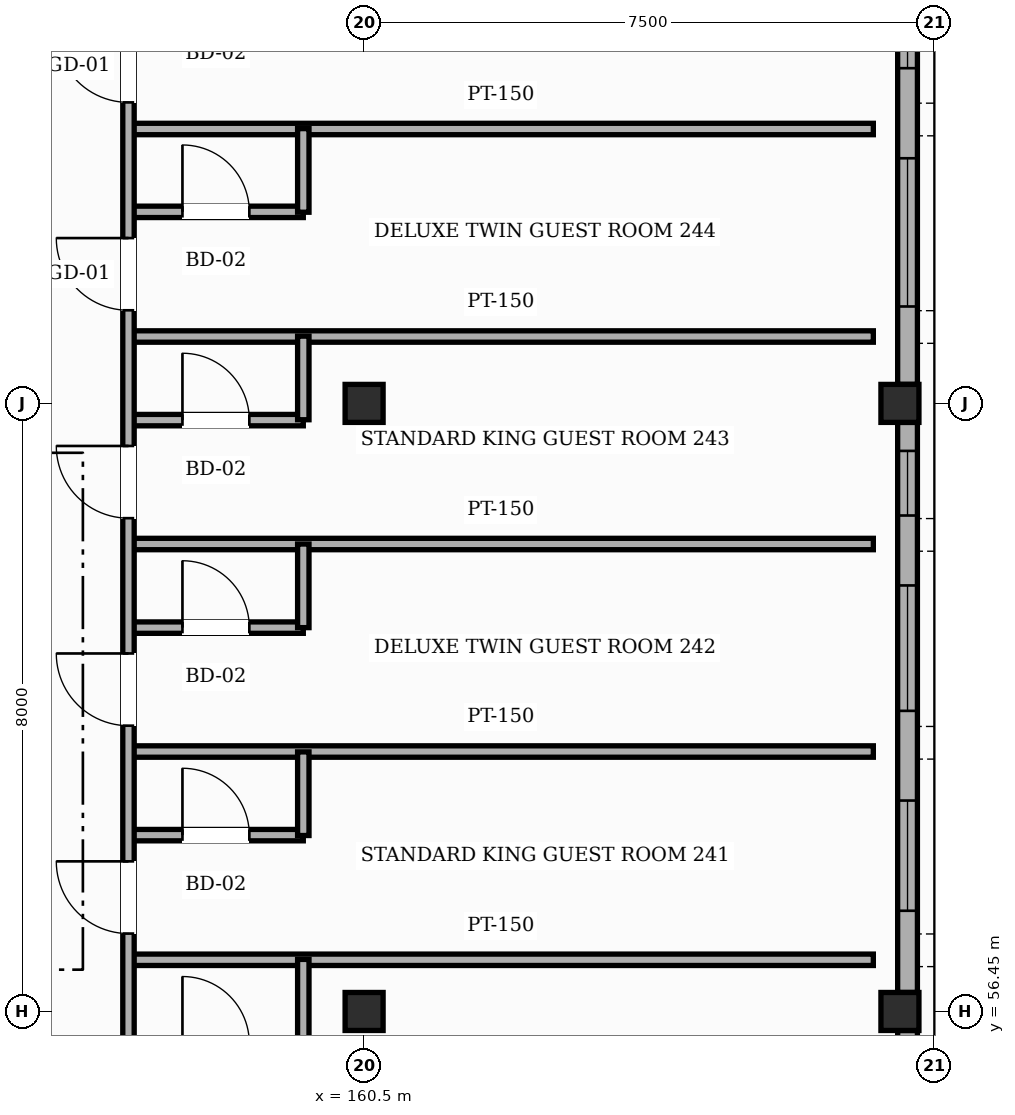
"""IFC4 building model, lengths in metres.
Left out: names, types, materials, properties, quantities, classifications, styles, units other than length and angle.
Written with IfcOpenShell. Run it as: python <this file> out.ifc"""

import sys

from ifc_helpers import new_model, si_unit, direction, frame, frame_2d, origin, origin_2d, place, context, subcontext, project, spatial, rectangle, hollow_rectangle, extrude, element, fill, save


model = new_model("IFC4")
c1 = context("Model", 3, precision=1e-05, world=origin(), true_north=direction((0.0, 1.0)))
c2 = subcontext(c1, "Body", "Model", "MODEL_VIEW")
j1 = project(units=[si_unit("LENGTHUNIT", "METRE"), si_unit("PLANEANGLEUNIT", "RADIAN")], contexts=[c1])
p1 = place(None, origin())
s1 = spatial("IfcSite", under=j1, at=p1, CompositionType="ELEMENT")
p2 = place(p1, origin())
s2 = spatial("IfcBuilding", under=s1, at=p2, CompositionType="ELEMENT")
p3 = place(p2, frame((0.0, 0.0, 35.4)))
s3 = spatial("IfcBuildingStorey", under=s2, at=p3, CompositionType="ELEMENT", Elevation=35.4)
for number, where, z_axis, x_axis in (
    (1, (160.5, 56.45, 0.0), (0.0, 0.0, 1.0), (1.0, 0.0, 0.0)),
    (2, (160.5, 64.45, 0.0), (0.0, 0.0, 1.0), (1.0, 0.0, 0.0)),
    (3, (167.55, 56.45, 0.0), (0.0, 0.0, 1.0), (1.0, 0.0, 0.0)),
    (4, (167.55, 64.45, 0.0), (0.0, 0.0, 1.0), (1.0, 0.0, 0.0)),
):
    element("IfcColumn", number, at=place(p3, frame(where, z_axis=z_axis, x_axis=x_axis)), inside=s3, PredefinedType="COLUMN", context=c2, shape_type="SweptSolid", body=[
        extrude(hollow_rectangle(XDim=0.5, YDim=0.5, WallThickness=0.022, InnerFilletRadius=0.022, OuterFilletRadius=0.044, at=origin_2d()), origin(), (0.0, 0.0, 1.0), 3.6),
    ])
p4 = place(p3, frame((167.65, 56.2, 0.0), z_axis=(0.0, 0.0, 1.0), x_axis=(0.0, -1.0, 0.0)))
e5 = element("IfcWall", 5, at=p4, inside=s3, PredefinedType="SOLIDWALL", context=c2, shape_type="SweptSolid", body=[
    extrude(rectangle(XDim=1.8, YDim=0.26, at=frame_2d((0.9, 0.0))), origin(), (0.0, 0.0, 1.0), 2.755),
])
p5 = place(p4, frame((0.275, 0.0, 0.85)))
e6 = element("IfcOpeningElement", 6, at=p5, cuts=e5, PredefinedType="OPENING", context=c2, shape_type="SweptSolid", body=[
    extrude(rectangle(XDim=1.25, YDim=1.35, at=frame_2d((0.625, 0.675))), frame((0.0, 0.14, 0.0), z_axis=(0.0, -1.0, 0.0), x_axis=(1.0, 0.0, 0.0)), (0.0, 0.0, 1.0), 0.28),
])
p6 = place(p3, frame((167.65, 64.2, 0.0), z_axis=(0.0, 0.0, 1.0), x_axis=(0.0, -1.0, 0.0)))
e7 = element("IfcWall", 7, at=p6, inside=s3, PredefinedType="SOLIDWALL", context=c2, shape_type="SweptSolid", body=[
    extrude(rectangle(XDim=7.5, YDim=0.26, at=frame_2d((3.75, 0.0))), origin(), (0.0, 0.0, 1.0), 2.755),
])
p7 = place(p6, frame((4.975, 0.0, 0.85)))
e8 = element("IfcOpeningElement", 8, at=p7, cuts=e7, PredefinedType="OPENING", context=c2, shape_type="SweptSolid", body=[
    extrude(rectangle(XDim=1.45, YDim=1.35, at=frame_2d((0.725, 0.675))), frame((0.0, 0.14, 0.0), z_axis=(0.0, -1.0, 0.0), x_axis=(1.0, 0.0, 0.0)), (0.0, 0.0, 1.0), 0.28),
])
p8 = place(p6, frame((2.145, 0.0, 0.85)))
e9 = element("IfcOpeningElement", 9, at=p8, cuts=e7, PredefinedType="OPENING", context=c2, shape_type="SweptSolid", body=[
    extrude(rectangle(XDim=1.65, YDim=1.35, at=frame_2d((0.825, 0.675))), frame((0.0, 0.14, 0.0), z_axis=(0.0, -1.0, 0.0), x_axis=(1.0, 0.0, 0.0)), (0.0, 0.0, 1.0), 0.28),
])
p9 = place(p6, frame((0.375, 0.0, 0.85)))
e10 = element("IfcOpeningElement", 10, at=p9, cuts=e7, PredefinedType="OPENING", context=c2, shape_type="SweptSolid", body=[
    extrude(rectangle(XDim=0.85, YDim=1.35, at=frame_2d((0.425, 0.675))), frame((0.0, 0.14, 0.0), z_axis=(0.0, -1.0, 0.0), x_axis=(1.0, 0.0, 0.0)), (0.0, 0.0, 1.0), 0.28),
])
p10 = place(p3, frame((167.65, 70.8, 0.0), z_axis=(0.0, 0.0, 1.0), x_axis=(0.0, -1.0, 0.0)))
e11 = element("IfcWall", 11, at=p10, inside=s3, PredefinedType="SOLIDWALL", context=c2, shape_type="SweptSolid", body=[
    extrude(rectangle(XDim=6.1, YDim=0.26, at=frame_2d((3.05, 0.0))), origin(), (0.0, 0.0, 1.0), 3.365),
])
p11 = place(p10, frame((3.125, 0.0, 0.85)))
e12 = element("IfcOpeningElement", 12, at=p11, cuts=e11, PredefinedType="OPENING", context=c2, shape_type="SweptSolid", body=[
    extrude(rectangle(XDim=1.95, YDim=1.95, at=frame_2d((0.975, 0.975))), frame((0.0, 0.14, 0.0), z_axis=(0.0, -1.0, 0.0), x_axis=(1.0, 0.0, 0.0)), (0.0, 0.0, 1.0), 0.28),
])
p12 = place(p10, frame((0.79, 0.0, 0.85)))
e13 = element("IfcOpeningElement", 13, at=p12, cuts=e11, PredefinedType="OPENING", context=c2, shape_type="SweptSolid", body=[
    extrude(rectangle(XDim=1.15, YDim=1.35, at=frame_2d((0.575, 0.675))), frame((0.0, 0.14, 0.0), z_axis=(0.0, -1.0, 0.0), x_axis=(1.0, 0.0, 0.0)), (0.0, 0.0, 1.0), 0.28),
])
p13 = place(p3, frame((157.4, 57.13, 0.0), z_axis=(0.0, 0.0, 1.0), x_axis=(1.0, 0.0, 0.0)))
e14 = element("IfcWall", 14, at=p13, inside=s3, PredefinedType="PARTITIONING", context=c2, shape_type="SweptSolid", body=[
    extrude(rectangle(XDim=9.8, YDim=0.15, at=frame_2d((4.9, 0.0))), origin(), (0.0, 0.0, 1.0), 3.365),
])
p14 = place(p3, frame((157.4, 58.77, 0.0), z_axis=(0.0, 0.0, 1.0), x_axis=(1.0, 0.0, 0.0)))
e15 = element("IfcWall", 15, at=p14, inside=s3, PredefinedType="PARTITIONING", context=c2, shape_type="SweptSolid", body=[
    extrude(rectangle(XDim=2.3, YDim=0.15, at=frame_2d((1.15, 0.0))), origin(), (0.0, 0.0, 1.0), 3.365),
])
p15 = place(p14, frame((0.71, 0.0, 0.0)))
e16 = element("IfcOpeningElement", 16, at=p15, cuts=e15, PredefinedType="OPENING", context=c2, shape_type="SweptSolid", body=[
    extrude(rectangle(XDim=0.88, YDim=2.12, at=frame_2d((0.44, 1.06))), frame((0.0, 0.085, 0.0), z_axis=(0.0, -1.0, 0.0), x_axis=(1.0, 0.0, 0.0)), (0.0, 0.0, 1.0), 0.17),
])
p16 = place(p3, frame((157.4, 59.87, 0.0), z_axis=(0.0, 0.0, 1.0), x_axis=(1.0, 0.0, 0.0)))
e17 = element("IfcWall", 17, at=p16, inside=s3, PredefinedType="PARTITIONING", context=c2, shape_type="SweptSolid", body=[
    extrude(rectangle(XDim=9.8, YDim=0.15, at=frame_2d((4.9, 0.0))), origin(), (0.0, 0.0, 1.0), 3.365),
])
p17 = place(p3, frame((157.4, 61.5, 0.0), z_axis=(0.0, 0.0, 1.0), x_axis=(1.0, 0.0, 0.0)))
e18 = element("IfcWall", 18, at=p17, inside=s3, PredefinedType="PARTITIONING", context=c2, shape_type="SweptSolid", body=[
    extrude(rectangle(XDim=2.3, YDim=0.15, at=frame_2d((1.15, 0.0))), origin(), (0.0, 0.0, 1.0), 3.365),
])
p18 = place(p17, frame((0.71, 0.0, 0.0)))
e19 = element("IfcOpeningElement", 19, at=p18, cuts=e18, PredefinedType="OPENING", context=c2, shape_type="SweptSolid", body=[
    extrude(rectangle(XDim=0.88, YDim=2.12, at=frame_2d((0.44, 1.06))), frame((0.0, 0.085, 0.0), z_axis=(0.0, -1.0, 0.0), x_axis=(1.0, 0.0, 0.0)), (0.0, 0.0, 1.0), 0.17),
])
p19 = place(p3, frame((157.4, 62.6, 0.0), z_axis=(0.0, 0.0, 1.0), x_axis=(1.0, 0.0, 0.0)))
e20 = element("IfcWall", 20, at=p19, inside=s3, PredefinedType="PARTITIONING", context=c2, shape_type="SweptSolid", body=[
    extrude(rectangle(XDim=9.8, YDim=0.15, at=frame_2d((4.9, 0.0))), origin(), (0.0, 0.0, 1.0), 3.365),
])
p20 = place(p3, frame((157.4, 64.23, 0.0), z_axis=(0.0, 0.0, 1.0), x_axis=(1.0, 0.0, 0.0)))
e21 = element("IfcWall", 21, at=p20, inside=s3, PredefinedType="PARTITIONING", context=c2, shape_type="SweptSolid", body=[
    extrude(rectangle(XDim=2.3, YDim=0.15, at=frame_2d((1.15, 0.0))), origin(), (0.0, 0.0, 1.0), 2.755),
])
p21 = place(p20, frame((0.71, 0.0, 0.0)))
e22 = element("IfcOpeningElement", 22, at=p21, cuts=e21, PredefinedType="OPENING", context=c2, shape_type="SweptSolid", body=[
    extrude(rectangle(XDim=0.88, YDim=2.12, at=frame_2d((0.44, 1.06))), frame((0.0, 0.085, 0.0), z_axis=(0.0, -1.0, 0.0), x_axis=(1.0, 0.0, 0.0)), (0.0, 0.0, 1.0), 0.17),
])
p22 = place(p3, frame((157.4, 65.33, 0.0), z_axis=(0.0, 0.0, 1.0), x_axis=(1.0, 0.0, 0.0)))
e23 = element("IfcWall", 23, at=p22, inside=s3, PredefinedType="PARTITIONING", context=c2, shape_type="SweptSolid", body=[
    extrude(rectangle(XDim=9.8, YDim=0.15, at=frame_2d((4.9, 0.0))), origin(), (0.0, 0.0, 1.0), 3.365),
])
p23 = place(p3, frame((157.4, 66.97, 0.0), z_axis=(0.0, 0.0, 1.0), x_axis=(1.0, 0.0, 0.0)))
e24 = element("IfcWall", 24, at=p23, inside=s3, PredefinedType="PARTITIONING", context=c2, shape_type="SweptSolid", body=[
    extrude(rectangle(XDim=2.3, YDim=0.15, at=frame_2d((1.15, 0.0))), origin(), (0.0, 0.0, 1.0), 3.365),
])
p24 = place(p23, frame((0.71, 0.0, 0.0)))
e25 = element("IfcOpeningElement", 25, at=p24, cuts=e24, PredefinedType="OPENING", context=c2, shape_type="SweptSolid", body=[
    extrude(rectangle(XDim=0.88, YDim=2.12, at=frame_2d((0.44, 1.06))), frame((0.0, 0.085, 0.0), z_axis=(0.0, -1.0, 0.0), x_axis=(1.0, 0.0, 0.0)), (0.0, 0.0, 1.0), 0.17),
])
p25 = place(p3, frame((157.4, 68.06, 0.0), z_axis=(0.0, 0.0, 1.0), x_axis=(1.0, 0.0, 0.0)))
e26 = element("IfcWall", 26, at=p25, inside=s3, PredefinedType="PARTITIONING", context=c2, shape_type="SweptSolid", body=[
    extrude(rectangle(XDim=9.8, YDim=0.15, at=frame_2d((4.9, 0.0))), origin(), (0.0, 0.0, 1.0), 3.365),
])
p26 = place(p3, frame((157.4, 22.3, 0.0), z_axis=(0.0, 0.0, 1.0), x_axis=(0.0, 1.0, 0.0)))
e27 = element("IfcWall", 27, at=p26, inside=s3, PredefinedType="PARTITIONING", context=c2, shape_type="SweptSolid", body=[
    extrude(rectangle(XDim=48.5, YDim=0.15, at=frame_2d((24.25, 0.0))), origin(), (0.0, 0.0, 1.0), 3.365),
])
p27 = place(p26, frame((24.875, 0.0, 0.0)))
e28 = element("IfcOpeningElement", 28, at=p27, cuts=e27, PredefinedType="OPENING", context=c2, shape_type="SweptSolid", body=[
    extrude(rectangle(XDim=1.65, YDim=2.35, at=frame_2d((0.825, 1.175))), frame((0.0, 0.085, 0.0), z_axis=(0.0, -1.0, 0.0), x_axis=(1.0, 0.0, 0.0)), (0.0, 0.0, 1.0), 0.17),
])
p28 = place(p26, frame((0.275, 0.0, 0.0)))
e29 = element("IfcOpeningElement", 29, at=p28, cuts=e27, PredefinedType="OPENING", context=c2, shape_type="SweptSolid", body=[
    extrude(rectangle(XDim=1.1, YDim=2.2, at=frame_2d((0.55, 1.1))), frame((0.0, 0.085, 0.0), z_axis=(0.0, -1.0, 0.0), x_axis=(1.0, 0.0, 0.0)), (0.0, 0.0, 1.0), 0.17),
])
p29 = place(p26, frame((3.11, 0.0, 0.0)))
e30 = element("IfcOpeningElement", 30, at=p29, cuts=e27, PredefinedType="OPENING", context=c2, shape_type="SweptSolid", body=[
    extrude(rectangle(XDim=0.95, YDim=2.15, at=frame_2d((0.475, 1.075))), frame((0.0, 0.085, 0.0), z_axis=(0.0, -1.0, 0.0), x_axis=(1.0, 0.0, 0.0)), (0.0, 0.0, 1.0), 0.17),
])
p30 = place(p26, frame((5.865, 0.0, 0.0)))
e31 = element("IfcOpeningElement", 31, at=p30, cuts=e27, PredefinedType="OPENING", context=c2, shape_type="SweptSolid", body=[
    extrude(rectangle(XDim=0.95, YDim=2.15, at=frame_2d((0.475, 1.075))), frame((0.0, 0.085, 0.0), z_axis=(0.0, -1.0, 0.0), x_axis=(1.0, 0.0, 0.0)), (0.0, 0.0, 1.0), 0.17),
])
p31 = place(p26, frame((8.625, 0.0, 0.0)))
e32 = element("IfcOpeningElement", 32, at=p31, cuts=e27, PredefinedType="OPENING", context=c2, shape_type="SweptSolid", body=[
    extrude(rectangle(XDim=0.95, YDim=2.15, at=frame_2d((0.475, 1.075))), frame((0.0, 0.085, 0.0), z_axis=(0.0, -1.0, 0.0), x_axis=(1.0, 0.0, 0.0)), (0.0, 0.0, 1.0), 0.17),
])
p32 = place(p26, frame((11.38, 0.0, 0.0)))
e33 = element("IfcOpeningElement", 33, at=p32, cuts=e27, PredefinedType="OPENING", context=c2, shape_type="SweptSolid", body=[
    extrude(rectangle(XDim=0.95, YDim=2.15, at=frame_2d((0.475, 1.075))), frame((0.0, 0.085, 0.0), z_axis=(0.0, -1.0, 0.0), x_axis=(1.0, 0.0, 0.0)), (0.0, 0.0, 1.0), 0.17),
])
p33 = place(p26, frame((14.14, 0.0, 0.0)))
e34 = element("IfcOpeningElement", 34, at=p33, cuts=e27, PredefinedType="OPENING", context=c2, shape_type="SweptSolid", body=[
    extrude(rectangle(XDim=0.95, YDim=2.15, at=frame_2d((0.475, 1.075))), frame((0.0, 0.085, 0.0), z_axis=(0.0, -1.0, 0.0), x_axis=(1.0, 0.0, 0.0)), (0.0, 0.0, 1.0), 0.17),
])
p34 = place(p26, frame((16.895, 0.0, 0.0)))
e35 = element("IfcOpeningElement", 35, at=p34, cuts=e27, PredefinedType="OPENING", context=c2, shape_type="SweptSolid", body=[
    extrude(rectangle(XDim=0.95, YDim=2.15, at=frame_2d((0.475, 1.075))), frame((0.0, 0.085, 0.0), z_axis=(0.0, -1.0, 0.0), x_axis=(1.0, 0.0, 0.0)), (0.0, 0.0, 1.0), 0.17),
])
p35 = place(p26, frame((32.37, 0.0, 0.0)))
e36 = element("IfcOpeningElement", 36, at=p35, cuts=e27, PredefinedType="OPENING", context=c2, shape_type="SweptSolid", body=[
    extrude(rectangle(XDim=1.1, YDim=2.2, at=frame_2d((0.55, 1.1))), frame((0.0, 0.085, 0.0), z_axis=(0.0, -1.0, 0.0), x_axis=(1.0, 0.0, 0.0)), (0.0, 0.0, 1.0), 0.17),
])
p36 = place(p26, frame((35.175, 0.0, 0.0)))
e37 = element("IfcOpeningElement", 37, at=p36, cuts=e27, PredefinedType="OPENING", context=c2, shape_type="SweptSolid", body=[
    extrude(rectangle(XDim=0.95, YDim=2.15, at=frame_2d((0.475, 1.075))), frame((0.0, 0.085, 0.0), z_axis=(0.0, -1.0, 0.0), x_axis=(1.0, 0.0, 0.0)), (0.0, 0.0, 1.0), 0.17),
])
p37 = place(p26, frame((37.91, 0.0, 0.0)))
e38 = element("IfcOpeningElement", 38, at=p37, cuts=e27, PredefinedType="OPENING", context=c2, shape_type="SweptSolid", body=[
    extrude(rectangle(XDim=0.95, YDim=2.15, at=frame_2d((0.475, 1.075))), frame((0.0, 0.085, 0.0), z_axis=(0.0, -1.0, 0.0), x_axis=(1.0, 0.0, 0.0)), (0.0, 0.0, 1.0), 0.17),
])
p38 = place(p26, frame((40.64, 0.0, 0.0)))
e39 = element("IfcOpeningElement", 39, at=p38, cuts=e27, PredefinedType="OPENING", context=c2, shape_type="SweptSolid", body=[
    extrude(rectangle(XDim=0.95, YDim=2.15, at=frame_2d((0.475, 1.075))), frame((0.0, 0.085, 0.0), z_axis=(0.0, -1.0, 0.0), x_axis=(1.0, 0.0, 0.0)), (0.0, 0.0, 1.0), 0.17),
])
p39 = place(p26, frame((43.375, 0.0, 0.0)))
e40 = element("IfcOpeningElement", 40, at=p39, cuts=e27, PredefinedType="OPENING", context=c2, shape_type="SweptSolid", body=[
    extrude(rectangle(XDim=0.95, YDim=2.15, at=frame_2d((0.475, 1.075))), frame((0.0, 0.085, 0.0), z_axis=(0.0, -1.0, 0.0), x_axis=(1.0, 0.0, 0.0)), (0.0, 0.0, 1.0), 0.17),
])
p40 = place(p26, frame((46.11, 0.0, 0.0)))
e41 = element("IfcOpeningElement", 41, at=p40, cuts=e27, PredefinedType="OPENING", context=c2, shape_type="SweptSolid", body=[
    extrude(rectangle(XDim=0.95, YDim=2.15, at=frame_2d((0.475, 1.075))), frame((0.0, 0.085, 0.0), z_axis=(0.0, -1.0, 0.0), x_axis=(1.0, 0.0, 0.0)), (0.0, 0.0, 1.0), 0.17),
])
for number, where, z_axis, x_axis in (
    (42, (159.7, 56.035, 0.0), (0.0, 0.0, 1.0), (0.0, 1.0, 0.0)),
    (43, (159.7, 58.765, 0.0), (0.0, 0.0, 1.0), (0.0, 1.0, 0.0)),
    (44, (159.7, 61.5, 0.0), (0.0, 0.0, 1.0), (0.0, 1.0, 0.0)),
):
    element("IfcWall", number, at=place(p3, frame(where, z_axis=z_axis, x_axis=x_axis)), inside=s3, PredefinedType="PARTITIONING", context=c2, shape_type="SweptSolid", body=[
        extrude(rectangle(XDim=1.1, YDim=0.15, at=frame_2d((0.55, 0.0))), origin(), (0.0, 0.0, 1.0), 3.365),
    ])
for number, where, z_axis, x_axis in (
    (45, (159.7, 64.235, 0.0), (0.0, 0.0, 1.0), (0.0, 1.0, 0.0)),
    (46, (159.7, 66.965, 0.0), (0.0, 0.0, 1.0), (0.0, 1.0, 0.0)),
):
    element("IfcWall", number, at=place(p3, frame(where, z_axis=z_axis, x_axis=x_axis)), inside=s3, PredefinedType="PARTITIONING", context=c2, shape_type="SweptSolid", body=[
        extrude(rectangle(XDim=1.1, YDim=0.15, at=frame_2d((0.55, 0.0))), origin(), (0.0, 0.0, 1.0), 3.365),
    ])
p41 = place(p7, origin())
e47 = element("IfcWindow", 47, at=p41, inside=s3, PartitioningType="SINGLE_PANEL", PredefinedType="WINDOW", context=c2, shape_type="SweptSolid", body=[
    extrude(rectangle(XDim=1.45, YDim=1.35, at=frame_2d((0.725, 0.675))), frame((0.0, 0.03, 0.0), z_axis=(0.0, -1.0, 0.0), x_axis=(1.0, 0.0, 0.0)), (0.0, 0.0, 1.0), 0.06),
])
fill(e8, e47)
p42 = place(p8, origin())
e48 = element("IfcWindow", 48, at=p42, inside=s3, PartitioningType="SINGLE_PANEL", PredefinedType="WINDOW", context=c2, shape_type="SweptSolid", body=[
    extrude(rectangle(XDim=1.65, YDim=1.35, at=frame_2d((0.825, 0.675))), frame((0.0, 0.03, 0.0), z_axis=(0.0, -1.0, 0.0), x_axis=(1.0, 0.0, 0.0)), (0.0, 0.0, 1.0), 0.06),
])
fill(e9, e48)
p43 = place(p9, origin())
e49 = element("IfcWindow", 49, at=p43, inside=s3, PartitioningType="SINGLE_PANEL", PredefinedType="WINDOW", context=c2, shape_type="SweptSolid", body=[
    extrude(rectangle(XDim=0.85, YDim=1.35, at=frame_2d((0.425, 0.675))), frame((0.0, 0.03, 0.0), z_axis=(0.0, -1.0, 0.0), x_axis=(1.0, 0.0, 0.0)), (0.0, 0.0, 1.0), 0.06),
])
fill(e10, e49)
p44 = place(p11, origin())
e50 = element("IfcWindow", 50, at=p44, inside=s3, PartitioningType="SINGLE_PANEL", PredefinedType="WINDOW", context=c2, shape_type="SweptSolid", body=[
    extrude(rectangle(XDim=1.95, YDim=1.95, at=frame_2d((0.975, 0.975))), frame((0.0, 0.03, 0.0), z_axis=(0.0, -1.0, 0.0), x_axis=(1.0, 0.0, 0.0)), (0.0, 0.0, 1.0), 0.06),
])
fill(e12, e50)
p45 = place(p12, origin())
e51 = element("IfcWindow", 51, at=p45, inside=s3, PartitioningType="SINGLE_PANEL", PredefinedType="WINDOW", context=c2, shape_type="SweptSolid", body=[
    extrude(rectangle(XDim=1.15, YDim=1.35, at=frame_2d((0.575, 0.675))), frame((0.0, 0.03, 0.0), z_axis=(0.0, -1.0, 0.0), x_axis=(1.0, 0.0, 0.0)), (0.0, 0.0, 1.0), 0.06),
])
fill(e13, e51)
p46 = place(p36, origin())
e52 = element("IfcDoor", 52, at=p46, inside=s3, OperationType="SINGLE_SWING_RIGHT", PredefinedType="DOOR", context=c2, shape_type="SweptSolid", body=[
    extrude(rectangle(XDim=0.95, YDim=2.15, at=frame_2d((0.475, 1.075))), frame((0.0, 0.025, 0.0), z_axis=(0.0, -1.0, 0.0), x_axis=(1.0, 0.0, 0.0)), (0.0, 0.0, 1.0), 0.05),
])
fill(e37, e52)
p47 = place(p15, origin())
e53 = element("IfcDoor", 53, at=p47, inside=s3, OperationType="SINGLE_SWING_LEFT", PredefinedType="DOOR", context=c2, shape_type="SweptSolid", body=[
    extrude(rectangle(XDim=0.88, YDim=2.12, at=frame_2d((0.44, 1.06))), frame((0.0, 0.025, 0.0), z_axis=(0.0, -1.0, 0.0), x_axis=(1.0, 0.0, 0.0)), (0.0, 0.0, 1.0), 0.05),
])
fill(e16, e53)
p48 = place(p37, origin())
e54 = element("IfcDoor", 54, at=p48, inside=s3, OperationType="SINGLE_SWING_RIGHT", PredefinedType="DOOR", context=c2, shape_type="SweptSolid", body=[
    extrude(rectangle(XDim=0.95, YDim=2.15, at=frame_2d((0.475, 1.075))), frame((0.0, 0.025, 0.0), z_axis=(0.0, -1.0, 0.0), x_axis=(1.0, 0.0, 0.0)), (0.0, 0.0, 1.0), 0.05),
])
fill(e38, e54)
p49 = place(p18, origin())
e55 = element("IfcDoor", 55, at=p49, inside=s3, OperationType="SINGLE_SWING_LEFT", PredefinedType="DOOR", context=c2, shape_type="SweptSolid", body=[
    extrude(rectangle(XDim=0.88, YDim=2.12, at=frame_2d((0.44, 1.06))), frame((0.0, 0.025, 0.0), z_axis=(0.0, -1.0, 0.0), x_axis=(1.0, 0.0, 0.0)), (0.0, 0.0, 1.0), 0.05),
])
fill(e19, e55)
p50 = place(p38, origin())
e56 = element("IfcDoor", 56, at=p50, inside=s3, OperationType="SINGLE_SWING_RIGHT", PredefinedType="DOOR", context=c2, shape_type="SweptSolid", body=[
    extrude(rectangle(XDim=0.95, YDim=2.15, at=frame_2d((0.475, 1.075))), frame((0.0, 0.025, 0.0), z_axis=(0.0, -1.0, 0.0), x_axis=(1.0, 0.0, 0.0)), (0.0, 0.0, 1.0), 0.05),
])
fill(e39, e56)
p51 = place(p21, origin())
e57 = element("IfcDoor", 57, at=p51, inside=s3, OperationType="SINGLE_SWING_LEFT", PredefinedType="DOOR", context=c2, shape_type="SweptSolid", body=[
    extrude(rectangle(XDim=0.88, YDim=2.12, at=frame_2d((0.44, 1.06))), frame((0.0, 0.025, 0.0), z_axis=(0.0, -1.0, 0.0), x_axis=(1.0, 0.0, 0.0)), (0.0, 0.0, 1.0), 0.05),
])
fill(e22, e57)
p52 = place(p39, origin())
e58 = element("IfcDoor", 58, at=p52, inside=s3, OperationType="SINGLE_SWING_RIGHT", PredefinedType="DOOR", context=c2, shape_type="SweptSolid", body=[
    extrude(rectangle(XDim=0.95, YDim=2.15, at=frame_2d((0.475, 1.075))), frame((0.0, 0.025, 0.0), z_axis=(0.0, -1.0, 0.0), x_axis=(1.0, 0.0, 0.0)), (0.0, 0.0, 1.0), 0.05),
])
fill(e40, e58)
p53 = place(p24, origin())
e59 = element("IfcDoor", 59, at=p53, inside=s3, OperationType="SINGLE_SWING_LEFT", PredefinedType="DOOR", context=c2, shape_type="SweptSolid", body=[
    extrude(rectangle(XDim=0.88, YDim=2.12, at=frame_2d((0.44, 1.06))), frame((0.0, 0.025, 0.0), z_axis=(0.0, -1.0, 0.0), x_axis=(1.0, 0.0, 0.0)), (0.0, 0.0, 1.0), 0.05),
])
fill(e25, e59)
p54 = place(p40, origin())
e60 = element("IfcDoor", 60, at=p54, inside=s3, OperationType="SINGLE_SWING_RIGHT", PredefinedType="DOOR", context=c2, shape_type="SweptSolid", body=[
    extrude(rectangle(XDim=0.95, YDim=2.15, at=frame_2d((0.475, 1.075))), frame((0.0, 0.025, 0.0), z_axis=(0.0, -1.0, 0.0), x_axis=(1.0, 0.0, 0.0)), (0.0, 0.0, 1.0), 0.05),
])
fill(e41, e60)
save(model, sys.argv[1])
